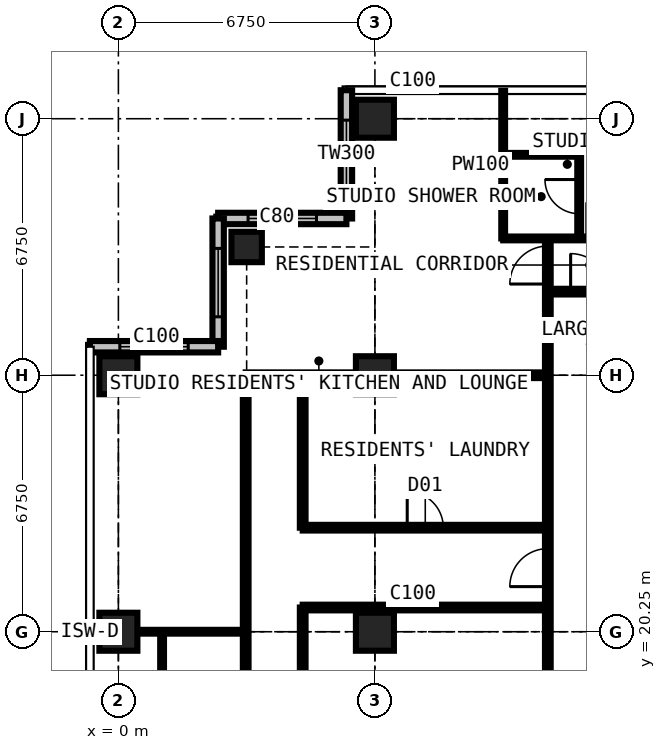
"""IFC4 building model, lengths in metres.
Left out: names, types, materials, properties, quantities, classifications, styles, units other than length and angle.
Written with IfcOpenShell. Run it as: python <this file> out.ifc"""

import sys

from ifc_helpers import new_model, si_unit, direction, frame, frame_2d, origin, origin_2d, place, context, subcontext, project, spatial, rectangle, extrude, element, fill, save


model = new_model("IFC4")
c1 = context("Model", 3, precision=1e-05, world=origin(), true_north=direction((0.0, 1.0)))
c2 = subcontext(c1, "Body", "Model", "MODEL_VIEW")
j1 = project(units=[si_unit("LENGTHUNIT", "METRE"), si_unit("PLANEANGLEUNIT", "RADIAN")], contexts=[c1])
p1 = place(None, origin())
s1 = spatial("IfcSite", under=j1, at=p1, CompositionType="ELEMENT")
p2 = place(p1, origin())
s2 = spatial("IfcBuilding", under=s1, at=p2, CompositionType="ELEMENT")
p3 = place(p2, frame((0.0, 0.0, 243.9)))
s3 = spatial("IfcBuildingStorey", under=s2, at=p3, CompositionType="ELEMENT", Elevation=243.9)
for number, where, z_axis, x_axis in (
    (1, (0.0, 20.25, 0.0), (0.0, 0.0, 1.0), (1.0, 0.0, 0.0)),
    (2, (0.0, 27.0, 0.0), (0.0, 0.0, 1.0), (1.0, 0.0, 0.0)),
):
    element("IfcColumn", number, at=place(p3, frame(where, z_axis=z_axis, x_axis=x_axis)), inside=s3, PredefinedType="COLUMN", context=c2, shape_type="SweptSolid", body=[
        extrude(rectangle(XDim=1.0, YDim=1.0, at=origin_2d()), origin(), (0.0, 0.0, 1.0), 3.6),
    ])
p4 = place(p3, frame((3.375, 30.375, 0.0), z_axis=(0.0, 0.0, 1.0), x_axis=(1.0, 0.0, 0.0)))
e3 = element("IfcColumn", 3, at=p4, inside=s3, PredefinedType="COLUMN", context=c2, shape_type="SweptSolid", body=[
    extrude(rectangle(XDim=0.8, YDim=0.8, at=origin_2d()), origin(), (0.0, 0.0, 1.0), 3.6),
])
for number, where, z_axis, x_axis in (
    (4, (6.75, 20.25, 0.0), (0.0, 0.0, 1.0), (1.0, 0.0, 0.0)),
    (5, (6.75, 27.0, 0.0), (0.0, 0.0, 1.0), (1.0, 0.0, 0.0)),
    (6, (6.75, 33.75, 0.0), (0.0, 0.0, 1.0), (1.0, 0.0, 0.0)),
):
    element("IfcColumn", number, at=place(p3, frame(where, z_axis=z_axis, x_axis=x_axis)), inside=s3, PredefinedType="COLUMN", context=c2, shape_type="SweptSolid", body=[
        extrude(rectangle(XDim=1.0, YDim=1.0, at=origin_2d()), origin(), (0.0, 0.0, 1.0), 3.6),
    ])
p5 = place(p3, frame((6.0, 34.5, 0.0), z_axis=(0.0, 0.0, 1.0), x_axis=(0.0, -1.0, 0.0)))
e7 = element("IfcWall", 7, at=p5, inside=s3, PredefinedType="SOLIDWALL", context=c2, shape_type="SweptSolid", body=[
    extrude(rectangle(XDim=3.375, YDim=0.3, at=frame_2d((1.688, 0.0))), origin(), (0.0, 0.0, 1.0), 3.375),
])
p6 = place(p5, frame((0.788, 0.0, 0.6)))
e8 = element("IfcOpeningElement", 8, at=p6, cuts=e7, PredefinedType="OPENING", context=c2, shape_type="SweptSolid", body=[
    extrude(rectangle(XDim=1.8, YDim=2.1, at=frame_2d((0.9, 1.05))), frame((0.0, 0.16, 0.0), z_axis=(0.0, -1.0, 0.0), x_axis=(1.0, 0.0, 0.0)), (0.0, 0.0, 1.0), 0.32),
])
p7 = place(p3, frame((6.0, 31.125, 0.0), z_axis=(0.0, 0.0, 1.0), x_axis=(-1.0, 0.0, 0.0)))
e9 = element("IfcWall", 9, at=p7, inside=s3, PredefinedType="SOLIDWALL", context=c2, shape_type="SweptSolid", body=[
    extrude(rectangle(XDim=3.375, YDim=0.3, at=frame_2d((1.688, 0.0))), origin(), (0.0, 0.0, 1.0), 3.375),
])
p8 = place(p7, frame((0.788, 0.0, 0.6)))
e10 = element("IfcOpeningElement", 10, at=p8, cuts=e9, PredefinedType="OPENING", context=c2, shape_type="SweptSolid", body=[
    extrude(rectangle(XDim=1.8, YDim=2.1, at=frame_2d((0.9, 1.05))), frame((0.0, 0.16, 0.0), z_axis=(0.0, -1.0, 0.0), x_axis=(1.0, 0.0, 0.0)), (0.0, 0.0, 1.0), 0.32),
])
p9 = place(p3, frame((2.625, 31.125, 0.0), z_axis=(0.0, 0.0, 1.0), x_axis=(0.0, -1.0, 0.0)))
e11 = element("IfcWall", 11, at=p9, inside=s3, PredefinedType="SOLIDWALL", context=c2, shape_type="SweptSolid", body=[
    extrude(rectangle(XDim=3.375, YDim=0.3, at=frame_2d((1.688, 0.0))), origin(), (0.0, 0.0, 1.0), 3.375),
])
p10 = place(p9, frame((0.788, 0.0, 0.6)))
e12 = element("IfcOpeningElement", 12, at=p10, cuts=e11, PredefinedType="OPENING", context=c2, shape_type="SweptSolid", body=[
    extrude(rectangle(XDim=1.8, YDim=2.1, at=frame_2d((0.9, 1.05))), frame((0.0, 0.16, 0.0), z_axis=(0.0, -1.0, 0.0), x_axis=(1.0, 0.0, 0.0)), (0.0, 0.0, 1.0), 0.32),
])
p11 = place(p3, frame((2.625, 27.75, 0.0), z_axis=(0.0, 0.0, 1.0), x_axis=(-1.0, 0.0, 0.0)))
e13 = element("IfcWall", 13, at=p11, inside=s3, PredefinedType="SOLIDWALL", context=c2, shape_type="SweptSolid", body=[
    extrude(rectangle(XDim=3.375, YDim=0.3, at=frame_2d((1.688, 0.0))), origin(), (0.0, 0.0, 1.0), 3.375),
])
p12 = place(p11, frame((0.788, 0.0, 0.6)))
e14 = element("IfcOpeningElement", 14, at=p12, cuts=e13, PredefinedType="OPENING", context=c2, shape_type="SweptSolid", body=[
    extrude(rectangle(XDim=1.8, YDim=2.1, at=frame_2d((0.9, 1.05))), frame((0.0, 0.16, 0.0), z_axis=(0.0, -1.0, 0.0), x_axis=(1.0, 0.0, 0.0)), (0.0, 0.0, 1.0), 0.32),
])
p13 = place(p3, frame((-0.734, 20.25, 0.0), z_axis=(0.0, 0.0, 1.0), x_axis=(1.0, 0.0, 0.0)))
e15 = element("IfcWall", 15, at=p13, inside=s3, PredefinedType="PARTITIONING", context=c2, shape_type="SweptSolid", body=[
    extrude(rectangle(XDim=4.084, YDim=0.1, at=frame_2d((2.042, 0.0))), origin(), (0.0, 0.0, 1.0), 2.877),
])
p14 = place(p3, frame((1.15, 18.25, 0.0), z_axis=(0.0, 0.0, 1.0), x_axis=(0.0, 1.0, 0.0)))
e16 = element("IfcWall", 16, at=p14, inside=s3, PredefinedType="PARTITIONING", context=c2, shape_type="SweptSolid", body=[
    extrude(rectangle(XDim=2.0, YDim=0.1, at=frame_2d((1.0, 0.0))), origin(), (0.0, 0.0, 1.0), 3.375),
])
p15 = place(p3, frame((3.35, 13.5, 0.0), z_axis=(0.0, 0.0, 1.0), x_axis=(0.0, 1.0, 0.0)))
e17 = element("IfcWall", 17, at=p15, inside=s3, PredefinedType="PARTITIONING", context=c2, shape_type="SweptSolid", body=[
    extrude(rectangle(XDim=13.5, YDim=0.15, at=frame_2d((6.75, 0.0))), origin(), (0.0, 0.0, 1.0), 3.375),
])
p16 = place(p15, frame((0.25, 0.0, 0.0)))
e18 = element("IfcOpeningElement", 18, at=p16, cuts=e17, PredefinedType="OPENING", context=c2, shape_type="SweptSolid", body=[
    extrude(rectangle(XDim=0.95, YDim=2.2, at=frame_2d((0.475, 1.1))), frame((0.0, 0.085, 0.0), z_axis=(0.0, -1.0, 0.0), x_axis=(1.0, 0.0, 0.0)), (0.0, 0.0, 1.0), 0.17),
])
p17 = place(p15, frame((3.575, 0.0, 0.0)))
e19 = element("IfcOpeningElement", 19, at=p17, cuts=e17, PredefinedType="OPENING", context=c2, shape_type="SweptSolid", body=[
    extrude(rectangle(XDim=0.95, YDim=2.2, at=frame_2d((0.475, 1.1))), frame((0.0, 0.085, 0.0), z_axis=(0.0, -1.0, 0.0), x_axis=(1.0, 0.0, 0.0)), (0.0, 0.0, 1.0), 0.17),
])
p18 = place(p3, frame((3.35, 27.0, 0.0), z_axis=(0.0, 0.0, 1.0), x_axis=(1.0, 0.0, 0.0)))
e20 = element("IfcWall", 20, at=p18, inside=s3, PredefinedType="PARTITIONING", context=c2, shape_type="SweptSolid", body=[
    extrude(rectangle(XDim=7.95, YDim=0.15, at=frame_2d((3.975, 0.0))), origin(), (0.0, 0.0, 1.0), 2.877),
])
p19 = place(p3, frame((4.85, 12.775, 0.0), z_axis=(0.0, 0.0, 1.0), x_axis=(0.0, 1.0, 0.0)))
e21 = element("IfcWall", 21, at=p19, inside=s3, PredefinedType="PARTITIONING", context=c2, shape_type="SweptSolid", body=[
    extrude(rectangle(XDim=8.113, YDim=0.15, at=frame_2d((4.056, 0.0))), origin(), (0.0, 0.0, 1.0), 3.375),
])
p20 = place(p19, frame((3.6, 0.0, 0.0)))
e22 = element("IfcOpeningElement", 22, at=p20, cuts=e21, PredefinedType="OPENING", context=c2, shape_type="SweptSolid", body=[
    extrude(rectangle(XDim=0.95, YDim=2.2, at=frame_2d((0.475, 1.1))), frame((0.0, 0.085, 0.0), z_axis=(0.0, -1.0, 0.0), x_axis=(1.0, 0.0, 0.0)), (0.0, 0.0, 1.0), 0.17),
])
p21 = place(p3, frame((4.85, 20.887, 0.0), z_axis=(0.0, 0.0, 1.0), x_axis=(1.0, 0.0, 0.0)))
e23 = element("IfcWall", 23, at=p21, inside=s3, PredefinedType="PARTITIONING", context=c2, shape_type="SweptSolid", body=[
    extrude(rectangle(XDim=6.45, YDim=0.15, at=frame_2d((3.225, 0.0))), origin(), (0.0, 0.0, 1.0), 3.375),
])
p22 = place(p3, frame((4.85, 22.988, 0.0), z_axis=(0.0, 0.0, 1.0), x_axis=(0.0, 1.0, 0.0)))
e24 = element("IfcWall", 24, at=p22, inside=s3, PredefinedType="PARTITIONING", context=c2, shape_type="SweptSolid", body=[
    extrude(rectangle(XDim=4.012, YDim=0.15, at=frame_2d((2.006, 0.0))), origin(), (0.0, 0.0, 1.0), 3.375),
])
p23 = place(p3, frame((4.85, 22.988, 0.0), z_axis=(0.0, 0.0, 1.0), x_axis=(1.0, 0.0, 0.0)))
e25 = element("IfcWall", 25, at=p23, inside=s3, PredefinedType="PARTITIONING", context=c2, shape_type="SweptSolid", body=[
    extrude(rectangle(XDim=6.45, YDim=0.15, at=frame_2d((3.225, 0.0))), origin(), (0.0, 0.0, 1.0), 3.375),
])
p24 = place(p23, frame((2.75, 0.0, 0.0)))
e26 = element("IfcOpeningElement", 26, at=p24, cuts=e25, PredefinedType="OPENING", context=c2, shape_type="SweptSolid", body=[
    extrude(rectangle(XDim=0.95, YDim=2.2, at=frame_2d((0.475, 1.1))), frame((0.0, 0.085, 0.0), z_axis=(0.0, -1.0, 0.0), x_axis=(1.0, 0.0, 0.0)), (0.0, 0.0, 1.0), 0.17),
])
p25 = place(p3, frame((10.125, 30.6, 0.0), z_axis=(0.0, 0.0, 1.0), x_axis=(0.0, 1.0, 0.0)))
e27 = element("IfcWall", 27, at=p25, inside=s3, PredefinedType="PARTITIONING", context=c2, shape_type="SweptSolid", body=[
    extrude(rectangle(XDim=3.884, YDim=0.1, at=frame_2d((1.942, 0.0))), origin(), (0.0, 0.0, 1.0), 3.375),
])
p26 = place(p3, frame((10.125, 30.6, 0.0), z_axis=(0.0, 0.0, 1.0), x_axis=(1.0, 0.0, 0.0)))
e28 = element("IfcWall", 28, at=p26, inside=s3, PredefinedType="PARTITIONING", context=c2, shape_type="SweptSolid", body=[
    extrude(rectangle(XDim=3.375, YDim=0.1, at=frame_2d((1.688, 0.0))), origin(), (0.0, 0.0, 1.0), 3.375),
])
p27 = place(p26, frame((2.2, 0.0, 0.0)))
e29 = element("IfcOpeningElement", 29, at=p27, cuts=e28, PredefinedType="OPENING", context=c2, shape_type="SweptSolid", body=[
    extrude(rectangle(XDim=0.95, YDim=2.2, at=frame_2d((0.475, 1.1))), frame((0.0, 0.06, 0.0), z_axis=(0.0, -1.0, 0.0), x_axis=(1.0, 0.0, 0.0)), (0.0, 0.0, 1.0), 0.12),
])
p28 = place(p3, frame((10.125, 32.8, 0.0), z_axis=(0.0, 0.0, 1.0), x_axis=(1.0, 0.0, 0.0)))
e30 = element("IfcWall", 30, at=p28, inside=s3, PredefinedType="PARTITIONING", context=c2, shape_type="SweptSolid", body=[
    extrude(rectangle(XDim=2.0, YDim=0.1, at=frame_2d((1.0, 0.0))), origin(), (0.0, 0.0, 1.0), 3.375),
])
p29 = place(p3, frame((11.3, 11.3, 0.0), z_axis=(0.0, 0.0, 1.0), x_axis=(0.0, 1.0, 0.0)))
e31 = element("IfcWall", 31, at=p29, inside=s3, PredefinedType="PARTITIONING", context=c2, shape_type="SweptSolid", body=[
    extrude(rectangle(XDim=19.3, YDim=0.15, at=frame_2d((9.65, 0.0))), origin(), (0.0, 0.0, 1.0), 3.375),
])
p30 = place(p29, frame((18.1, 0.0, 0.0)))
e32 = element("IfcOpeningElement", 32, at=p30, cuts=e31, PredefinedType="OPENING", context=c2, shape_type="SweptSolid", body=[
    extrude(rectangle(XDim=1.0, YDim=2.2, at=frame_2d((0.5, 1.1))), frame((0.0, 0.085, 0.0), z_axis=(0.0, -1.0, 0.0), x_axis=(1.0, 0.0, 0.0)), (0.0, 0.0, 1.0), 0.17),
])
p31 = place(p29, frame((10.137, 0.0, 0.0)))
e33 = element("IfcOpeningElement", 33, at=p31, cuts=e31, PredefinedType="OPENING", context=c2, shape_type="SweptSolid", body=[
    extrude(rectangle(XDim=1.0, YDim=2.2, at=frame_2d((0.5, 1.1))), frame((0.0, 0.085, 0.0), z_axis=(0.0, -1.0, 0.0), x_axis=(1.0, 0.0, 0.0)), (0.0, 0.0, 1.0), 0.17),
])
p32 = place(p3, frame((11.3, 29.2, 0.0), z_axis=(0.0, 0.0, 1.0), x_axis=(1.0, 0.0, 0.0)))
e34 = element("IfcWall", 34, at=p32, inside=s3, PredefinedType="PARTITIONING", context=c2, shape_type="SweptSolid", body=[
    extrude(rectangle(XDim=19.809, YDim=0.15, at=frame_2d((9.904, 0.0))), origin(), (0.0, 0.0, 1.0), 3.375),
])
p33 = place(p32, frame((14.625, 0.0, 0.0)))
e35 = element("IfcOpeningElement", 35, at=p33, cuts=e34, PredefinedType="OPENING", context=c2, shape_type="SweptSolid", body=[
    extrude(rectangle(XDim=1.0, YDim=2.2, at=frame_2d((0.5, 1.1))), frame((0.0, 0.085, 0.0), z_axis=(0.0, -1.0, 0.0), x_axis=(1.0, 0.0, 0.0)), (0.0, 0.0, 1.0), 0.17),
])
p34 = place(p32, frame((6.4, 0.0, 0.0)))
e36 = element("IfcOpeningElement", 36, at=p34, cuts=e34, PredefinedType="OPENING", context=c2, shape_type="SweptSolid", body=[
    extrude(rectangle(XDim=0.95, YDim=2.2, at=frame_2d((0.475, 1.1))), frame((0.0, 0.085, 0.0), z_axis=(0.0, -1.0, 0.0), x_axis=(1.0, 0.0, 0.0)), (0.0, 0.0, 1.0), 0.17),
])
p35 = place(p32, frame((9.2, 0.0, 0.0)))
e37 = element("IfcOpeningElement", 37, at=p35, cuts=e34, PredefinedType="OPENING", context=c2, shape_type="SweptSolid", body=[
    extrude(rectangle(XDim=0.95, YDim=2.2, at=frame_2d((0.475, 1.1))), frame((0.0, 0.085, 0.0), z_axis=(0.0, -1.0, 0.0), x_axis=(1.0, 0.0, 0.0)), (0.0, 0.0, 1.0), 0.17),
])
p36 = place(p32, frame((0.6, 0.0, 0.0)))
e38 = element("IfcOpeningElement", 38, at=p36, cuts=e34, PredefinedType="OPENING", context=c2, shape_type="SweptSolid", body=[
    extrude(rectangle(XDim=1.0, YDim=2.2, at=frame_2d((0.5, 1.1))), frame((0.0, 0.085, 0.0), z_axis=(0.0, -1.0, 0.0), x_axis=(1.0, 0.0, 0.0)), (0.0, 0.0, 1.0), 0.17),
])
p37 = place(p3, frame((12.125, 30.6, 0.0), z_axis=(0.0, 0.0, 1.0), x_axis=(0.0, 1.0, 0.0)))
e39 = element("IfcWall", 39, at=p37, inside=s3, PredefinedType="PARTITIONING", context=c2, shape_type="SweptSolid", body=[
    extrude(rectangle(XDim=2.2, YDim=0.1, at=frame_2d((1.1, 0.0))), origin(), (0.0, 0.0, 1.0), 3.375),
])
p38 = place(p37, frame((0.65, 0.0, 0.0)))
e40 = element("IfcOpeningElement", 40, at=p38, cuts=e39, PredefinedType="OPENING", context=c2, shape_type="SweptSolid", body=[
    extrude(rectangle(XDim=0.9, YDim=2.2, at=frame_2d((0.45, 1.1))), frame((0.0, 0.06, 0.0), z_axis=(0.0, -1.0, 0.0), x_axis=(1.0, 0.0, 0.0)), (0.0, 0.0, 1.0), 0.12),
])
p39 = place(p6, origin())
e41 = element("IfcWindow", 41, at=p39, inside=s3, PartitioningType="SINGLE_PANEL", PredefinedType="WINDOW", context=c2, shape_type="SweptSolid", body=[
    extrude(rectangle(XDim=1.8, YDim=2.1, at=frame_2d((0.9, 1.05))), frame((0.0, 0.03, 0.0), z_axis=(0.0, -1.0, 0.0), x_axis=(1.0, 0.0, 0.0)), (0.0, 0.0, 1.0), 0.06),
])
fill(e8, e41)
p40 = place(p8, origin())
e42 = element("IfcWindow", 42, at=p40, inside=s3, PartitioningType="SINGLE_PANEL", PredefinedType="WINDOW", context=c2, shape_type="SweptSolid", body=[
    extrude(rectangle(XDim=1.8, YDim=2.1, at=frame_2d((0.9, 1.05))), frame((0.0, 0.03, 0.0), z_axis=(0.0, -1.0, 0.0), x_axis=(1.0, 0.0, 0.0)), (0.0, 0.0, 1.0), 0.06),
])
fill(e10, e42)
p41 = place(p10, origin())
e43 = element("IfcWindow", 43, at=p41, inside=s3, PartitioningType="SINGLE_PANEL", PredefinedType="WINDOW", context=c2, shape_type="SweptSolid", body=[
    extrude(rectangle(XDim=1.8, YDim=2.1, at=frame_2d((0.9, 1.05))), frame((0.0, 0.03, 0.0), z_axis=(0.0, -1.0, 0.0), x_axis=(1.0, 0.0, 0.0)), (0.0, 0.0, 1.0), 0.06),
])
fill(e12, e43)
p42 = place(p12, origin())
e44 = element("IfcWindow", 44, at=p42, inside=s3, PartitioningType="SINGLE_PANEL", PredefinedType="WINDOW", context=c2, shape_type="SweptSolid", body=[
    extrude(rectangle(XDim=1.8, YDim=2.1, at=frame_2d((0.9, 1.05))), frame((0.0, 0.03, 0.0), z_axis=(0.0, -1.0, 0.0), x_axis=(1.0, 0.0, 0.0)), (0.0, 0.0, 1.0), 0.06),
])
fill(e14, e44)
p43 = place(p38, origin())
e45 = element("IfcDoor", 45, at=p43, inside=s3, OperationType="SINGLE_SWING_RIGHT", PredefinedType="DOOR", context=c2, shape_type="SweptSolid", body=[
    extrude(rectangle(XDim=0.9, YDim=2.2, at=frame_2d((0.45, 1.1))), frame((0.0, 0.025, 0.0), z_axis=(0.0, -1.0, 0.0), x_axis=(1.0, 0.0, 0.0)), (0.0, 0.0, 1.0), 0.05),
])
fill(e40, e45)
p44 = place(p36, origin())
e46 = element("IfcDoor", 46, at=p44, inside=s3, OperationType="SINGLE_SWING_LEFT", PredefinedType="DOOR", context=c2, shape_type="SweptSolid", body=[
    extrude(rectangle(XDim=1.0, YDim=2.2, at=frame_2d((0.5, 1.1))), frame((0.0, 0.025, 0.0), z_axis=(0.0, -1.0, 0.0), x_axis=(1.0, 0.0, 0.0)), (0.0, 0.0, 1.0), 0.05),
])
fill(e38, e46)
p45 = place(p30, origin())
e47 = element("IfcDoor", 47, at=p45, inside=s3, OperationType="SINGLE_SWING_LEFT", PredefinedType="DOOR", context=c2, shape_type="SweptSolid", body=[
    extrude(rectangle(XDim=1.0, YDim=2.2, at=frame_2d((0.5, 1.1))), frame((0.0, 0.025, 0.0), z_axis=(0.0, -1.0, 0.0), x_axis=(1.0, 0.0, 0.0)), (0.0, 0.0, 1.0), 0.05),
])
fill(e32, e47)
p46 = place(p31, origin())
e48 = element("IfcDoor", 48, at=p46, inside=s3, OperationType="SINGLE_SWING_LEFT", PredefinedType="DOOR", context=c2, shape_type="SweptSolid", body=[
    extrude(rectangle(XDim=1.0, YDim=2.2, at=frame_2d((0.5, 1.1))), frame((0.0, 0.025, 0.0), z_axis=(0.0, -1.0, 0.0), x_axis=(1.0, 0.0, 0.0)), (0.0, 0.0, 1.0), 0.05),
])
fill(e33, e48)
p47 = place(p24, origin())
e49 = element("IfcDoor", 49, at=p47, inside=s3, OperationType="SINGLE_SWING_LEFT", PredefinedType="DOOR", context=c2, shape_type="SweptSolid", body=[
    extrude(rectangle(XDim=0.95, YDim=2.2, at=frame_2d((0.475, 1.1))), frame((0.0, 0.025, 0.0), z_axis=(0.0, -1.0, 0.0), x_axis=(1.0, 0.0, 0.0)), (0.0, 0.0, 1.0), 0.05),
])
fill(e26, e49)
save(model, sys.argv[1])
